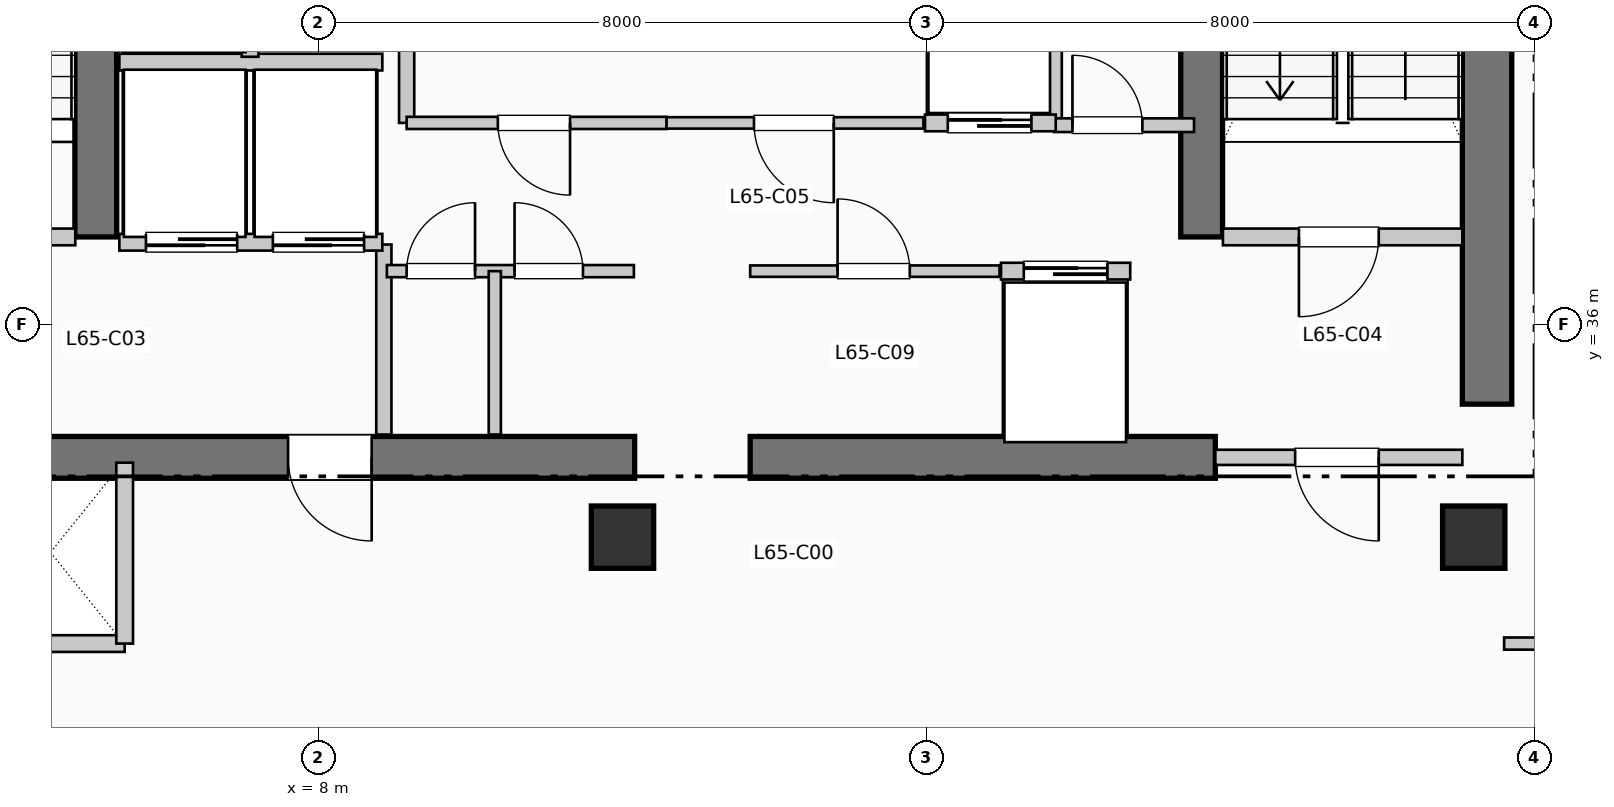
"""IFC4 building model, lengths in metres.
Left out: names, types, materials, properties, quantities, classifications, styles, units other than length and angle.
Written with IfcOpenShell. Run it as: python <this file> out.ifc"""

import sys

from ifc_helpers import new_model, si_unit, direction, frame, frame_2d, origin, origin_2d, place, context, subcontext, project, spatial, rectangle, extrude, element, fill, save


model = new_model("IFC4")
c1 = context("Model", 3, precision=1e-05, world=origin(), true_north=direction((0.0, 1.0)))
c2 = subcontext(c1, "Body", "Model", "MODEL_VIEW")
j1 = project(units=[si_unit("LENGTHUNIT", "METRE"), si_unit("PLANEANGLEUNIT", "RADIAN")], contexts=[c1])
p1 = place(None, origin())
s1 = spatial("IfcSite", under=j1, at=p1, CompositionType="ELEMENT")
p2 = place(p1, origin())
s2 = spatial("IfcBuilding", under=s1, at=p2, CompositionType="ELEMENT")
p3 = place(p2, frame((0.0, 0.0, 268.29)))
s3 = spatial("IfcBuildingStorey", under=s2, at=p3, CompositionType="ELEMENT", Elevation=268.29)
p4 = place(p3, frame((23.375, 34.95, 0.0), z_axis=(0.0, 0.0, 1.0), x_axis=(0.0, 1.0, 0.0)))
e1 = element("IfcWall", 1, at=p4, inside=s3, PredefinedType="SHEAR", context=c2, shape_type="SweptSolid", body=[
    extrude(rectangle(XDim=10.64, YDim=0.65, at=frame_2d((5.32, 0.0))), origin(), (0.0, 0.0, 1.0), 3.96),
])
p5 = place(p3, frame((1.45, 34.25, 0.0), z_axis=(0.0, 0.0, 1.0), x_axis=(1.0, 0.0, 0.0)))
e2 = element("IfcWall", 2, at=p5, inside=s3, PredefinedType="SHEAR", context=c2, shape_type="SweptSolid", body=[
    extrude(rectangle(XDim=10.71, YDim=0.55, at=frame_2d((5.355, 0.0))), origin(), (0.0, 0.0, 1.0), 3.96),
])
p6 = place(p5, frame((7.25, 0.0, 0.0), z_axis=(0.0, 0.0, 1.0), x_axis=(-1.0, 0.0, 0.0)))
e3 = element("IfcOpeningElement", 3, at=p6, cuts=e2, PredefinedType="OPENING", context=c2, shape_type="SweptSolid", body=[
    extrude(rectangle(XDim=1.1, YDim=2.15, at=frame_2d((0.55, 1.075))), frame((0.0, 0.285, 0.0), z_axis=(0.0, -1.0, 0.0), x_axis=(1.0, 0.0, 0.0)), (0.0, 0.0, 1.0), 0.57),
])
p7 = place(p3, frame((13.68, 34.25, 0.0), z_axis=(0.0, 0.0, 1.0), x_axis=(1.0, 0.0, 0.0)))
e4 = element("IfcWall", 4, at=p7, inside=s3, PredefinedType="SHEAR", context=c2, shape_type="SweptSolid", body=[
    extrude(rectangle(XDim=6.12, YDim=0.55, at=frame_2d((3.06, 0.0))), origin(), (0.0, 0.0, 1.0), 3.96),
])
for number, where, z_axis, x_axis in (
    (5, (5.07, 37.15, 0.0), (0.0, 0.0, 1.0), (0.0, 1.0, 0.0)),
    (6, (19.62, 37.15, 0.0), (0.0, 0.0, 1.0), (0.0, 1.0, 0.0)),
):
    element("IfcWall", number, at=place(p3, frame(where, z_axis=z_axis, x_axis=x_axis)), inside=s3, PredefinedType="SHEAR", context=c2, shape_type="SweptSolid", body=[
        extrude(rectangle(XDim=7.89, YDim=0.55, at=frame_2d((3.945, 0.0))), origin(), (0.0, 0.0, 1.0), 3.96),
    ])
for number, where, z_axis, x_axis in (
    (7, (12.0, 33.2, 0.0), (0.0, 0.0, 1.0), (1.0, 0.0, 0.0)),
    (8, (23.2, 33.2, 0.0), (0.0, 0.0, 1.0), (1.0, 0.0, 0.0)),
):
    element("IfcColumn", number, at=place(p3, frame(where, z_axis=z_axis, x_axis=x_axis)), inside=s3, PredefinedType="COLUMN", context=c2, shape_type="SweptSolid", body=[
        extrude(rectangle(XDim=0.82, YDim=0.82, at=origin_2d()), origin(), (0.0, 0.0, 1.0), 3.96),
    ])
p8 = place(p3, frame((1.65, 37.15, 0.0), z_axis=(0.0, 0.0, 1.0), x_axis=(1.0, 0.0, 0.0)))
e9 = element("IfcWall", 9, at=p8, inside=s3, PredefinedType="PARTITIONING", context=c2, shape_type="SweptSolid", body=[
    extrude(rectangle(XDim=3.15, YDim=0.22, at=frame_2d((1.575, 0.0))), origin(), (0.0, 0.0, 1.0), 3.74),
])
p9 = place(p8, frame((2.05, 0.0, 0.0), z_axis=(0.0, 0.0, 1.0), x_axis=(-1.0, 0.0, 0.0)))
e10 = element("IfcOpeningElement", 10, at=p9, cuts=e9, PredefinedType="OPENING", context=c2, shape_type="SweptSolid", body=[
    extrude(rectangle(XDim=1.05, YDim=2.15, at=frame_2d((0.525, 1.075))), frame((0.0, 0.12, 0.0), z_axis=(0.0, -1.0, 0.0), x_axis=(1.0, 0.0, 0.0)), (0.0, 0.0, 1.0), 0.24),
])
p10 = place(p3, frame((8.86, 34.55, 0.0), z_axis=(0.0, 0.0, 1.0), x_axis=(0.0, 1.0, 0.0)))
e11 = element("IfcWall", 11, at=p10, inside=s3, PredefinedType="PARTITIONING", context=c2, shape_type="SweptSolid", body=[
    extrude(rectangle(XDim=2.5, YDim=0.2, at=frame_2d((1.25, 0.0))), origin(), (0.0, 0.0, 1.0), 3.74),
])
p11 = place(p3, frame((19.9, 37.15, 0.0), z_axis=(0.0, 0.0, 1.0), x_axis=(1.0, 0.0, 0.0)))
e12 = element("IfcWall", 12, at=p11, inside=s3, PredefinedType="PARTITIONING", context=c2, shape_type="SweptSolid", body=[
    extrude(rectangle(XDim=3.15, YDim=0.22, at=frame_2d((1.575, 0.0))), origin(), (0.0, 0.0, 1.0), 3.74),
])
p12 = place(p11, frame((2.05, 0.0, 0.0), z_axis=(0.0, 0.0, 1.0), x_axis=(-1.0, 0.0, 0.0)))
e13 = element("IfcOpeningElement", 13, at=p12, cuts=e12, PredefinedType="OPENING", context=c2, shape_type="SweptSolid", body=[
    extrude(rectangle(XDim=1.05, YDim=2.15, at=frame_2d((0.525, 1.075))), frame((0.0, 0.12, 0.0), z_axis=(0.0, -1.0, 0.0), x_axis=(1.0, 0.0, 0.0)), (0.0, 0.0, 1.0), 0.24),
])
p13 = place(p3, frame((19.8, 34.25, 0.0), z_axis=(0.0, 0.0, 1.0), x_axis=(1.0, 0.0, 0.0)))
e14 = element("IfcWall", 14, at=p13, inside=s3, PredefinedType="PARTITIONING", context=c2, shape_type="SweptSolid", body=[
    extrude(rectangle(XDim=3.25, YDim=0.2, at=frame_2d((1.625, 0.0))), origin(), (0.0, 0.0, 1.0), 3.74),
])
p14 = place(p13, frame((2.15, 0.0, 0.0), z_axis=(0.0, 0.0, 1.0), x_axis=(-1.0, 0.0, 0.0)))
e15 = element("IfcOpeningElement", 15, at=p14, cuts=e14, PredefinedType="OPENING", context=c2, shape_type="SweptSolid", body=[
    extrude(rectangle(XDim=1.1, YDim=2.15, at=frame_2d((0.55, 1.075))), frame((0.0, 0.11, 0.0), z_axis=(0.0, -1.0, 0.0), x_axis=(1.0, 0.0, 0.0)), (0.0, 0.0, 1.0), 0.22),
])
p15 = place(p3, frame((5.38, 37.08, 0.0), z_axis=(0.0, 0.0, 1.0), x_axis=(1.0, 0.0, 0.0)))
e16 = element("IfcWall", 16, at=p15, inside=s3, PredefinedType="PARTITIONING", context=c2, shape_type="SweptSolid", body=[
    extrude(rectangle(XDim=3.46, YDim=0.22, at=frame_2d((1.73, 0.0))), origin(), (0.0, 0.0, 1.0), 3.74),
])
p16 = place(p15, frame((1.55, 0.0, 0.0), z_axis=(0.0, 0.0, 1.0), x_axis=(-1.0, 0.0, 0.0)))
e17 = element("IfcOpeningElement", 17, at=p16, cuts=e16, PredefinedType="OPENING", context=c2, shape_type="SweptSolid", body=[
    extrude(rectangle(XDim=1.2, YDim=2.2, at=frame_2d((0.6, 1.1))), frame((0.0, 0.12, 0.0), z_axis=(0.0, -1.0, 0.0), x_axis=(1.0, 0.0, 0.0)), (0.0, 0.0, 1.0), 0.24),
])
p17 = place(p15, frame((3.22, 0.0, 0.0), z_axis=(0.0, 0.0, 1.0), x_axis=(-1.0, 0.0, 0.0)))
e18 = element("IfcOpeningElement", 18, at=p17, cuts=e16, PredefinedType="OPENING", context=c2, shape_type="SweptSolid", body=[
    extrude(rectangle(XDim=1.2, YDim=2.2, at=frame_2d((0.6, 1.1))), frame((0.0, 0.12, 0.0), z_axis=(0.0, -1.0, 0.0), x_axis=(1.0, 0.0, 0.0)), (0.0, 0.0, 1.0), 0.24),
])
p18 = place(p3, frame((5.38, 39.45, 0.0), z_axis=(0.0, 0.0, 1.0), x_axis=(1.0, 0.0, 0.0)))
e19 = element("IfcWall", 19, at=p18, inside=s3, PredefinedType="PARTITIONING", context=c2, shape_type="SweptSolid", body=[
    extrude(rectangle(XDim=3.46, YDim=0.22, at=frame_2d((1.73, 0.0))), origin(), (0.0, 0.0, 1.0), 3.74),
])
p19 = place(p3, frame((7.1, 39.52, 0.0), z_axis=(0.0, 0.0, 1.0), x_axis=(0.0, 1.0, 0.0)))
e20 = element("IfcWall", 20, at=p19, inside=s3, PredefinedType="PARTITIONING", context=c2, shape_type="SweptSolid", body=[
    extrude(rectangle(XDim=2.93, YDim=0.22, at=frame_2d((1.465, 0.0))), origin(), (0.0, 0.0, 1.0), 3.74),
])
p20 = place(p19, frame((0.85, 0.0, 0.0)))
e21 = element("IfcOpeningElement", 21, at=p20, cuts=e20, PredefinedType="OPENING", context=c2, shape_type="SweptSolid", body=[
    extrude(rectangle(XDim=1.1, YDim=2.2, at=frame_2d((0.55, 1.1))), frame((0.0, 0.12, 0.0), z_axis=(0.0, -1.0, 0.0), x_axis=(1.0, 0.0, 0.0)), (0.0, 0.0, 1.0), 0.24),
])
p21 = place(p3, frame((1.55, 31.8, 0.0), z_axis=(0.0, 0.0, 1.0), x_axis=(1.0, 0.0, 0.0)))
e22 = element("IfcWall", 22, at=p21, inside=s3, PredefinedType="PARTITIONING", context=c2, shape_type="SweptSolid", body=[
    extrude(rectangle(XDim=3.9, YDim=0.22, at=frame_2d((1.95, 0.0))), origin(), (0.0, 0.0, 1.0), 3.74),
])
p22 = place(p3, frame((5.45, 31.8, 0.0), z_axis=(0.0, 0.0, 1.0), x_axis=(0.0, 1.0, 0.0)))
e23 = element("IfcWall", 23, at=p22, inside=s3, PredefinedType="PARTITIONING", context=c2, shape_type="SweptSolid", body=[
    extrude(rectangle(XDim=2.38, YDim=0.22, at=frame_2d((1.19, 0.0))), origin(), (0.0, 0.0, 1.0), 3.74),
])
for number, where, z_axis, x_axis in (
    (24, (9.16, 38.65, 0.0), (0.0, 0.0, 1.0), (0.0, 1.0, 0.0)),
    (25, (17.68, 38.65, 0.0), (0.0, 0.0, 1.0), (0.0, 1.0, 0.0)),
):
    element("IfcWall", number, at=place(p3, frame(where, z_axis=z_axis, x_axis=x_axis)), inside=s3, PredefinedType="PARTITIONING", context=c2, shape_type="SweptSolid", body=[
        extrude(rectangle(XDim=2.35, YDim=0.2, at=frame_2d((1.175, 0.0))), origin(), (0.0, 0.0, 1.0), 3.74),
    ])
p23 = place(p3, frame((17.68, 38.62, 0.0), z_axis=(0.0, 0.0, 1.0), x_axis=(1.0, 0.0, 0.0)))
e26 = element("IfcWall", 26, at=p23, inside=s3, PredefinedType="PARTITIONING", context=c2, shape_type="SweptSolid", body=[
    extrude(rectangle(XDim=1.84, YDim=0.18, at=frame_2d((0.92, 0.0))), origin(), (0.0, 0.0, 1.0), 3.74),
])
p24 = place(p23, frame((0.24, 0.0, 0.0)))
e27 = element("IfcOpeningElement", 27, at=p24, cuts=e26, PredefinedType="OPENING", context=c2, shape_type="SweptSolid", body=[
    extrude(rectangle(XDim=0.92, YDim=2.1, at=frame_2d((0.46, 1.05))), frame((0.0, 0.1, 0.0), z_axis=(0.0, -1.0, 0.0), x_axis=(1.0, 0.0, 0.0)), (0.0, 0.0, 1.0), 0.2),
])
p25 = place(p3, frame((8.9, 36.7, 0.0), z_axis=(0.0, 0.0, 1.0), x_axis=(1.0, 0.0, 0.0)))
e28 = element("IfcWall", 28, at=p25, inside=s3, PredefinedType="PARTITIONING", context=c2, shape_type="SweptSolid", body=[
    extrude(rectangle(XDim=3.25, YDim=0.16, at=frame_2d((1.625, 0.0))), origin(), (0.0, 0.0, 1.0), 3.74),
])
p26 = place(p25, frame((0.26, 0.0, 0.0)))
e29 = element("IfcOpeningElement", 29, at=p26, cuts=e28, PredefinedType="OPENING", context=c2, shape_type="SweptSolid", body=[
    extrude(rectangle(XDim=0.9, YDim=2.15, at=frame_2d((0.45, 1.075))), frame((0.0, 0.09, 0.0), z_axis=(0.0, -1.0, 0.0), x_axis=(1.0, 0.0, 0.0)), (0.0, 0.0, 1.0), 0.18),
])
p27 = place(p25, frame((1.68, 0.0, 0.0)))
e30 = element("IfcOpeningElement", 30, at=p27, cuts=e28, PredefinedType="OPENING", context=c2, shape_type="SweptSolid", body=[
    extrude(rectangle(XDim=0.9, YDim=2.15, at=frame_2d((0.45, 1.075))), frame((0.0, 0.09, 0.0), z_axis=(0.0, -1.0, 0.0), x_axis=(1.0, 0.0, 0.0)), (0.0, 0.0, 1.0), 0.18),
])
p28 = place(p3, frame((10.32, 34.55, 0.0), z_axis=(0.0, 0.0, 1.0), x_axis=(0.0, 1.0, 0.0)))
e31 = element("IfcWall", 31, at=p28, inside=s3, PredefinedType="PARTITIONING", context=c2, shape_type="SweptSolid", body=[
    extrude(rectangle(XDim=2.15, YDim=0.16, at=frame_2d((1.075, 0.0))), origin(), (0.0, 0.0, 1.0), 3.74),
])
p29 = place(p3, frame((9.16, 38.65, 0.0), z_axis=(0.0, 0.0, 1.0), x_axis=(1.0, 0.0, 0.0)))
e32 = element("IfcWall", 32, at=p29, inside=s3, PredefinedType="PARTITIONING", context=c2, shape_type="SweptSolid", body=[
    extrude(rectangle(XDim=3.42, YDim=0.16, at=frame_2d((1.71, 0.0))), origin(), (0.0, 0.0, 1.0), 3.74),
])
p30 = place(p29, frame((2.15, 0.0, 0.0), z_axis=(0.0, 0.0, 1.0), x_axis=(-1.0, 0.0, 0.0)))
e33 = element("IfcOpeningElement", 33, at=p30, cuts=e32, PredefinedType="OPENING", context=c2, shape_type="SweptSolid", body=[
    extrude(rectangle(XDim=0.95, YDim=2.15, at=frame_2d((0.475, 1.075))), frame((0.0, 0.09, 0.0), z_axis=(0.0, -1.0, 0.0), x_axis=(1.0, 0.0, 0.0)), (0.0, 0.0, 1.0), 0.18),
])
p31 = place(p3, frame((13.68, 36.7, 0.0), z_axis=(0.0, 0.0, 1.0), x_axis=(1.0, 0.0, 0.0)))
e34 = element("IfcWall", 34, at=p31, inside=s3, PredefinedType="PARTITIONING", context=c2, shape_type="SweptSolid", body=[
    extrude(rectangle(XDim=3.28, YDim=0.15, at=frame_2d((1.64, 0.0))), origin(), (0.0, 0.0, 1.0), 3.74),
])
p32 = place(p31, frame((1.15, 0.0, 0.0)))
e35 = element("IfcOpeningElement", 35, at=p32, cuts=e34, PredefinedType="OPENING", context=c2, shape_type="SweptSolid", body=[
    extrude(rectangle(XDim=0.95, YDim=2.15, at=frame_2d((0.475, 1.075))), frame((0.0, 0.085, 0.0), z_axis=(0.0, -1.0, 0.0), x_axis=(1.0, 0.0, 0.0)), (0.0, 0.0, 1.0), 0.17),
])
p33 = place(p3, frame((12.58, 38.65, 0.0), z_axis=(0.0, 0.0, 1.0), x_axis=(1.0, 0.0, 0.0)))
e36 = element("IfcWall", 36, at=p33, inside=s3, PredefinedType="PARTITIONING", context=c2, shape_type="SweptSolid", body=[
    extrude(rectangle(XDim=3.38, YDim=0.15, at=frame_2d((1.69, 0.0))), origin(), (0.0, 0.0, 1.0), 3.74),
])
p34 = place(p33, frame((2.2, 0.0, 0.0), z_axis=(0.0, 0.0, 1.0), x_axis=(-1.0, 0.0, 0.0)))
e37 = element("IfcOpeningElement", 37, at=p34, cuts=e36, PredefinedType="OPENING", context=c2, shape_type="SweptSolid", body=[
    extrude(rectangle(XDim=1.05, YDim=2.15, at=frame_2d((0.525, 1.075))), frame((0.0, 0.085, 0.0), z_axis=(0.0, -1.0, 0.0), x_axis=(1.0, 0.0, 0.0)), (0.0, 0.0, 1.0), 0.17),
])
p35 = place(p3, frame((16.98, 36.7, 0.0), z_axis=(0.0, 0.0, 1.0), x_axis=(1.0, 0.0, 0.0)))
e38 = element("IfcWall", 38, at=p35, inside=s3, PredefinedType="PARTITIONING", context=c2, shape_type="SweptSolid", body=[
    extrude(rectangle(XDim=1.7, YDim=0.22, at=frame_2d((0.85, 0.0))), origin(), (0.0, 0.0, 1.0), 3.74),
])
p36 = place(p35, frame((0.3, 0.0, 0.0)))
e39 = element("IfcOpeningElement", 39, at=p36, cuts=e38, PredefinedType="OPENING", context=c2, shape_type="SweptSolid", body=[
    extrude(rectangle(XDim=1.1, YDim=2.2, at=frame_2d((0.55, 1.1))), frame((0.0, 0.12, 0.0), z_axis=(0.0, -1.0, 0.0), x_axis=(1.0, 0.0, 0.0)), (0.0, 0.0, 1.0), 0.24),
])
p37 = place(p3, frame((15.98, 38.65, 0.0), z_axis=(0.0, 0.0, 1.0), x_axis=(1.0, 0.0, 0.0)))
e40 = element("IfcWall", 40, at=p37, inside=s3, PredefinedType="PARTITIONING", context=c2, shape_type="SweptSolid", body=[
    extrude(rectangle(XDim=1.72, YDim=0.22, at=frame_2d((0.86, 0.0))), origin(), (0.0, 0.0, 1.0), 3.74),
])
p38 = place(p37, frame((0.3, 0.0, 0.0)))
e41 = element("IfcOpeningElement", 41, at=p38, cuts=e40, PredefinedType="OPENING", context=c2, shape_type="SweptSolid", body=[
    extrude(rectangle(XDim=1.1, YDim=2.2, at=frame_2d((0.55, 1.1))), frame((0.0, 0.12, 0.0), z_axis=(0.0, -1.0, 0.0), x_axis=(1.0, 0.0, 0.0)), (0.0, 0.0, 1.0), 0.24),
])
p39 = place(p3, frame((23.6, 31.8, 0.0), z_axis=(0.0, 0.0, 1.0), x_axis=(1.0, 0.0, 0.0)))
e42 = element("IfcWall", 42, at=p39, inside=s3, PredefinedType="PARTITIONING", context=c2, shape_type="SweptSolid", body=[
    extrude(rectangle(XDim=26.41, YDim=0.16, at=frame_2d((13.205, 0.0))), origin(), (0.0, 0.0, 1.0), 3.74),
])
p40 = place(p39, frame((12.73, 0.0, 0.0)))
e43 = element("IfcOpeningElement", 43, at=p40, cuts=e42, PredefinedType="OPENING", context=c2, shape_type="SweptSolid", body=[
    extrude(rectangle(XDim=0.95, YDim=2.15, at=frame_2d((0.475, 1.075))), frame((0.0, 0.09, 0.0), z_axis=(0.0, -1.0, 0.0), x_axis=(1.0, 0.0, 0.0)), (0.0, 0.0, 1.0), 0.18),
])
p41 = place(p6, origin())
e44 = element("IfcDoor", 44, at=p41, inside=s3, OperationType="SINGLE_SWING_RIGHT", PredefinedType="DOOR", context=c2, shape_type="SweptSolid", body=[
    extrude(rectangle(XDim=1.1, YDim=2.15, at=frame_2d((0.55, 1.075))), frame((0.0, 0.025, 0.0), z_axis=(0.0, -1.0, 0.0), x_axis=(1.0, 0.0, 0.0)), (0.0, 0.0, 1.0), 0.05),
])
fill(e3, e44)
p42 = place(p12, origin())
e45 = element("IfcDoor", 45, at=p42, inside=s3, OperationType="SINGLE_SWING_LEFT", PredefinedType="DOOR", context=c2, shape_type="SweptSolid", body=[
    extrude(rectangle(XDim=1.05, YDim=2.15, at=frame_2d((0.525, 1.075))), frame((0.0, 0.025, 0.0), z_axis=(0.0, -1.0, 0.0), x_axis=(1.0, 0.0, 0.0)), (0.0, 0.0, 1.0), 0.05),
])
fill(e13, e45)
p43 = place(p14, origin())
e46 = element("IfcDoor", 46, at=p43, inside=s3, OperationType="SINGLE_SWING_RIGHT", PredefinedType="DOOR", context=c2, shape_type="SweptSolid", body=[
    extrude(rectangle(XDim=1.1, YDim=2.15, at=frame_2d((0.55, 1.075))), frame((0.0, 0.025, 0.0), z_axis=(0.0, -1.0, 0.0), x_axis=(1.0, 0.0, 0.0)), (0.0, 0.0, 1.0), 0.05),
])
fill(e15, e46)
p44 = place(p16, origin())
e47 = element("IfcDoor", 47, at=p44, inside=s3, OperationType="SLIDING_TO_RIGHT", PredefinedType="DOOR", context=c2, shape_type="SweptSolid", body=[
    extrude(rectangle(XDim=1.2, YDim=2.2, at=frame_2d((0.6, 1.1))), frame((0.0, 0.025, 0.0), z_axis=(0.0, -1.0, 0.0), x_axis=(1.0, 0.0, 0.0)), (0.0, 0.0, 1.0), 0.05),
])
fill(e17, e47)
p45 = place(p17, origin())
e48 = element("IfcDoor", 48, at=p45, inside=s3, OperationType="SLIDING_TO_RIGHT", PredefinedType="DOOR", context=c2, shape_type="SweptSolid", body=[
    extrude(rectangle(XDim=1.2, YDim=2.2, at=frame_2d((0.6, 1.1))), frame((0.0, 0.025, 0.0), z_axis=(0.0, -1.0, 0.0), x_axis=(1.0, 0.0, 0.0)), (0.0, 0.0, 1.0), 0.05),
])
fill(e18, e48)
p46 = place(p24, origin())
e49 = element("IfcDoor", 49, at=p46, inside=s3, OperationType="SINGLE_SWING_LEFT", PredefinedType="DOOR", context=c2, shape_type="SweptSolid", body=[
    extrude(rectangle(XDim=0.92, YDim=2.1, at=frame_2d((0.46, 1.05))), frame((0.0, 0.025, 0.0), z_axis=(0.0, -1.0, 0.0), x_axis=(1.0, 0.0, 0.0)), (0.0, 0.0, 1.0), 0.05),
])
fill(e27, e49)
p47 = place(p26, origin())
e50 = element("IfcDoor", 50, at=p47, inside=s3, OperationType="SINGLE_SWING_RIGHT", PredefinedType="DOOR", context=c2, shape_type="SweptSolid", body=[
    extrude(rectangle(XDim=0.9, YDim=2.15, at=frame_2d((0.45, 1.075))), frame((0.0, 0.025, 0.0), z_axis=(0.0, -1.0, 0.0), x_axis=(1.0, 0.0, 0.0)), (0.0, 0.0, 1.0), 0.05),
])
fill(e29, e50)
p48 = place(p27, origin())
e51 = element("IfcDoor", 51, at=p48, inside=s3, OperationType="SINGLE_SWING_LEFT", PredefinedType="DOOR", context=c2, shape_type="SweptSolid", body=[
    extrude(rectangle(XDim=0.9, YDim=2.15, at=frame_2d((0.45, 1.075))), frame((0.0, 0.025, 0.0), z_axis=(0.0, -1.0, 0.0), x_axis=(1.0, 0.0, 0.0)), (0.0, 0.0, 1.0), 0.05),
])
fill(e30, e51)
p49 = place(p30, origin())
e52 = element("IfcDoor", 52, at=p49, inside=s3, OperationType="SINGLE_SWING_RIGHT", PredefinedType="DOOR", context=c2, shape_type="SweptSolid", body=[
    extrude(rectangle(XDim=0.95, YDim=2.15, at=frame_2d((0.475, 1.075))), frame((0.0, 0.025, 0.0), z_axis=(0.0, -1.0, 0.0), x_axis=(1.0, 0.0, 0.0)), (0.0, 0.0, 1.0), 0.05),
])
fill(e33, e52)
p50 = place(p32, origin())
e53 = element("IfcDoor", 53, at=p50, inside=s3, OperationType="SINGLE_SWING_LEFT", PredefinedType="DOOR", context=c2, shape_type="SweptSolid", body=[
    extrude(rectangle(XDim=0.95, YDim=2.15, at=frame_2d((0.475, 1.075))), frame((0.0, 0.025, 0.0), z_axis=(0.0, -1.0, 0.0), x_axis=(1.0, 0.0, 0.0)), (0.0, 0.0, 1.0), 0.05),
])
fill(e35, e53)
p51 = place(p34, origin())
e54 = element("IfcDoor", 54, at=p51, inside=s3, OperationType="SINGLE_SWING_RIGHT", PredefinedType="DOOR", context=c2, shape_type="SweptSolid", body=[
    extrude(rectangle(XDim=1.05, YDim=2.15, at=frame_2d((0.525, 1.075))), frame((0.0, 0.025, 0.0), z_axis=(0.0, -1.0, 0.0), x_axis=(1.0, 0.0, 0.0)), (0.0, 0.0, 1.0), 0.05),
])
fill(e37, e54)
p52 = place(p36, origin())
e55 = element("IfcDoor", 55, at=p52, inside=s3, OperationType="SLIDING_TO_LEFT", PredefinedType="DOOR", context=c2, shape_type="SweptSolid", body=[
    extrude(rectangle(XDim=1.1, YDim=2.2, at=frame_2d((0.55, 1.1))), frame((0.0, 0.025, 0.0), z_axis=(0.0, -1.0, 0.0), x_axis=(1.0, 0.0, 0.0)), (0.0, 0.0, 1.0), 0.05),
])
fill(e39, e55)
p53 = place(p38, origin())
e56 = element("IfcDoor", 56, at=p53, inside=s3, OperationType="SLIDING_TO_LEFT", PredefinedType="DOOR", context=c2, shape_type="SweptSolid", body=[
    extrude(rectangle(XDim=1.1, YDim=2.2, at=frame_2d((0.55, 1.1))), frame((0.0, 0.025, 0.0), z_axis=(0.0, -1.0, 0.0), x_axis=(1.0, 0.0, 0.0)), (0.0, 0.0, 1.0), 0.05),
])
fill(e41, e56)
save(model, sys.argv[1])
